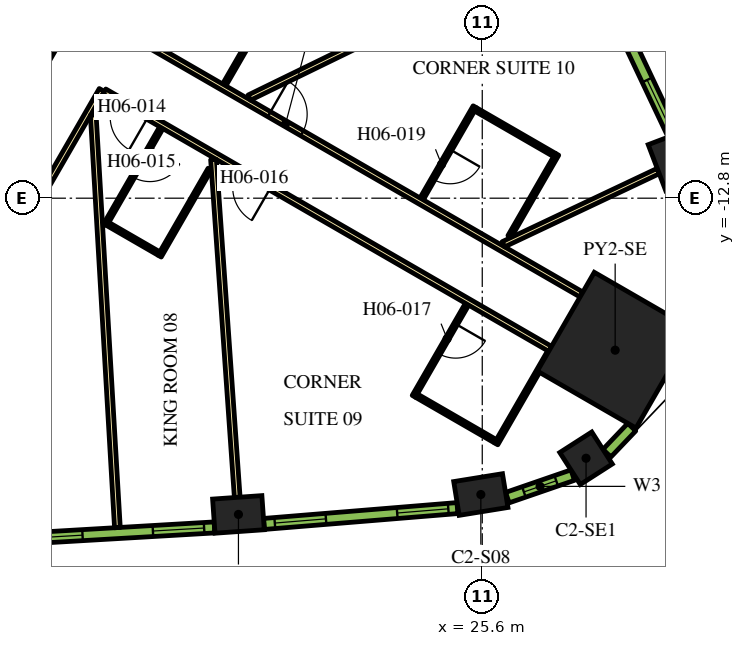
"""IFC4 building model, lengths in metres.
Left out: names, types, materials, properties, quantities, classifications, styles, units other than length and angle.
Written with IfcOpenShell. Run it as: python <this file> out.ifc"""

import sys

from ifc_helpers import new_model, si_unit, direction, frame, frame_2d, origin, origin_2d, place, context, subcontext, project, spatial, rectangle, extrude, element, fill, save


model = new_model("IFC4")
c1 = context("Model", 3, precision=1e-05, world=origin(), true_north=direction((0.0, 1.0)))
c2 = subcontext(c1, "Body", "Model", "MODEL_VIEW")
j1 = project(units=[si_unit("LENGTHUNIT", "METRE"), si_unit("PLANEANGLEUNIT", "RADIAN")], contexts=[c1])
p1 = place(None, origin())
s1 = spatial("IfcSite", under=j1, at=p1, CompositionType="ELEMENT")
p2 = place(p1, origin())
s2 = spatial("IfcBuilding", under=s1, at=p2, CompositionType="ELEMENT")
p3 = place(p2, frame((0.0, 0.0, 87.6)))
s3 = spatial("IfcBuildingStorey", under=s2, at=p3, CompositionType="ELEMENT", Elevation=87.6)
p4 = place(p3, frame((29.097, -16.799, 0.0), z_axis=(0.0, 0.0, 1.0), x_axis=(0.866025403784, -0.5, 0.0)))
e1 = element("IfcColumn", 1, at=p4, inside=s3, PredefinedType="COLUMN", context=c2, shape_type="SweptSolid", body=[
    extrude(rectangle(XDim=3.0, YDim=3.0, at=origin_2d()), origin(), (0.0, 0.0, 1.0), 3.9),
])
for number, where, z_axis, x_axis in (
    (2, (19.184, -21.12, 0.0), (0.0, 0.0, 1.0), (0.998, 0.07, 0.0)),
    (3, (25.563, -20.597, 0.0), (0.0, 0.0, 1.0), (0.987, 0.159, 0.0)),
):
    element("IfcColumn", number, at=place(p3, frame(where, z_axis=z_axis, x_axis=x_axis)), inside=s3, PredefinedType="COLUMN", context=c2, shape_type="SweptSolid", body=[
        extrude(rectangle(XDim=1.3, YDim=0.9, at=origin_2d()), origin(), (0.0, 0.0, 1.0), 3.9),
    ])
p5 = place(p3, frame((28.331, -19.643, 0.0), z_axis=(0.0, 0.0, 1.0), x_axis=(0.841700252504, 0.53994507585, 0.0)))
e4 = element("IfcColumn", 4, at=p5, inside=s3, PredefinedType="COLUMN", context=c2, shape_type="SweptSolid", body=[
    extrude(rectangle(XDim=1.0, YDim=1.0, at=origin_2d()), origin(), (0.0, 0.0, 1.0), 3.9),
])
p6 = place(p3, frame((30.619, -11.839, 0.0), z_axis=(0.0, 0.0, 1.0), x_axis=(-0.355493616145, 0.934678708905, 0.0)))
e5 = element("IfcColumn", 5, at=p6, inside=s3, PredefinedType="COLUMN", context=c2, shape_type="SweptSolid", body=[
    extrude(rectangle(XDim=1.3, YDim=0.9, at=origin_2d()), origin(), (0.0, 0.0, 1.0), 3.9),
])
p7 = place(p3, frame((11.695, -12.644, 0.0), z_axis=(0.0, 0.0, 1.0), x_axis=(0.500010229568, 0.86601949766, 0.0)))
e6 = element("IfcWall", 6, at=p7, inside=s3, PredefinedType="SOLIDWALL", context=c2, shape_type="SweptSolid", body=[
    extrude(rectangle(XDim=9.326, YDim=0.9, at=frame_2d((4.663, 0.0))), origin(), (0.0, 0.0, 1.0), 3.9),
])
p8 = place(p3, frame((12.885, -9.431, 0.0), z_axis=(0.0, 0.0, 1.0), x_axis=(0.500020560727, 0.866013532718, 0.0)))
e7 = element("IfcWall", 7, at=p8, inside=s3, PredefinedType="SOLIDWALL", context=c2, shape_type="SweptSolid", body=[
    extrude(rectangle(XDim=3.45, YDim=0.25, at=frame_2d((1.725, 0.0))), origin(), (0.0, 0.0, 1.0), 3.9),
])
p9 = place(p3, frame((16.412, -8.523, 0.0), z_axis=(0.0, 0.0, 1.0), x_axis=(0.866025629663, -0.499999608766, 0.0)))
e8 = element("IfcWall", 8, at=p9, inside=s3, PredefinedType="PARTITIONING", context=c2, shape_type="SweptSolid", body=[
    extrude(rectangle(XDim=13.624, YDim=0.15, at=frame_2d((6.812, 0.0))), origin(), (0.0, 0.0, 1.0), 2.75),
])
p10 = place(p9, frame((4.134, 0.0, 0.0)))
e9 = element("IfcOpeningElement", 9, at=p10, cuts=e8, PredefinedType="OPENING", context=c2, shape_type="SweptSolid", body=[
    extrude(rectangle(XDim=1.0, YDim=2.1, at=frame_2d((0.5, 1.05))), frame((0.0, 0.085, 0.0), z_axis=(0.0, -1.0, 0.0), x_axis=(1.0, 0.0, 0.0)), (0.0, 0.0, 1.0), 0.17),
])
p11 = place(p3, frame((15.587, -9.952, 0.0), z_axis=(0.0, 0.0, 1.0), x_axis=(-0.500016618951, -0.866015808616, 0.0)))
e10 = element("IfcWall", 10, at=p11, inside=s3, PredefinedType="PARTITIONING", context=c2, shape_type="SweptSolid", body=[
    extrude(rectangle(XDim=5.268, YDim=0.15, at=frame_2d((2.634, 0.0))), origin(), (0.0, 0.0, 1.0), 2.75),
])
p12 = place(p3, frame((27.386, -16.764, 0.0), z_axis=(0.0, 0.0, 1.0), x_axis=(-0.866022585856, 0.500004880763, 0.0)))
e11 = element("IfcWall", 11, at=p12, inside=s3, PredefinedType="PARTITIONING", context=c2, shape_type="SweptSolid", body=[
    extrude(rectangle(XDim=13.544, YDim=0.15, at=frame_2d((6.772, 0.0))), origin(), (0.0, 0.0, 1.0), 2.75),
])
p13 = place(p12, frame((12.214, 0.0, 0.0)))
e12 = element("IfcOpeningElement", 12, at=p13, cuts=e11, PredefinedType="OPENING", context=c2, shape_type="SweptSolid", body=[
    extrude(rectangle(XDim=1.0, YDim=2.1, at=frame_2d((0.5, 1.05))), frame((0.0, 0.085, 0.0), z_axis=(0.0, -1.0, 0.0), x_axis=(1.0, 0.0, 0.0)), (0.0, 0.0, 1.0), 0.17),
])
p14 = place(p12, frame((8.49, 0.0, 0.0)))
e13 = element("IfcOpeningElement", 13, at=p14, cuts=e11, PredefinedType="OPENING", context=c2, shape_type="SweptSolid", body=[
    extrude(rectangle(XDim=1.0, YDim=2.1, at=frame_2d((0.5, 1.05))), frame((0.0, 0.085, 0.0), z_axis=(0.0, -1.0, 0.0), x_axis=(1.0, 0.0, 0.0)), (0.0, 0.0, 1.0), 0.17),
])
p15 = place(p3, frame((15.999, -21.467, 0.0), z_axis=(0.0, 0.0, 1.0), x_axis=(-0.058433825336, 0.998291284173, 0.0)))
e14 = element("IfcWall", 14, at=p15, inside=s3, PredefinedType="PARTITIONING", context=c2, shape_type="SweptSolid", body=[
    extrude(rectangle(XDim=10.875, YDim=0.15, at=frame_2d((5.438, 0.0))), origin(), (0.0, 0.0, 1.0), 2.75),
])
p16 = place(p3, frame((19.153, -20.671, 0.0), z_axis=(0.0, 0.0, 1.0), x_axis=(-0.070070736723, 0.997542025107, 0.0)))
e15 = element("IfcWall", 15, at=p16, inside=s3, PredefinedType="PARTITIONING", context=c2, shape_type="SweptSolid", body=[
    extrude(rectangle(XDim=8.909, YDim=0.15, at=frame_2d((4.455, 0.0))), origin(), (0.0, 0.0, 1.0), 2.75),
])
p17 = place(p3, frame((27.479, -6.251, 0.0), z_axis=(0.0, 0.0, 1.0), x_axis=(-0.898945877276, -0.438059710231, 0.0)))
e16 = element("IfcWall", 16, at=p17, inside=s3, PredefinedType="PARTITIONING", context=c2, shape_type="SweptSolid", body=[
    extrude(rectangle(XDim=8.909, YDim=0.15, at=frame_2d((4.455, 0.0))), origin(), (0.0, 0.0, 1.0), 2.75),
])
p18 = place(p3, frame((30.231, -12.085, 0.0), z_axis=(0.0, 0.0, 1.0), x_axis=(-0.904001132572, -0.427530060122, 0.0)))
e17 = element("IfcWall", 17, at=p18, inside=s3, PredefinedType="PARTITIONING", context=c2, shape_type="SweptSolid", body=[
    extrude(rectangle(XDim=4.51, YDim=0.15, at=frame_2d((2.255, 0.0))), origin(), (0.0, 0.0, 1.0), 2.75),
])
p19 = place(p3, frame((17.155, -10.944, 0.0), z_axis=(0.0, 0.0, 1.0), x_axis=(-0.499939757307, -0.866060182126, 0.0)))
e18 = element("IfcWall", 18, at=p19, inside=s3, PredefinedType="PARTITIONING", context=c2, shape_type="SweptSolid", body=[
    extrude(rectangle(XDim=2.95, YDim=0.1, at=frame_2d((1.475, 0.0))), origin(), (0.0, 0.0, 1.0), 2.75),
])
p20 = place(p19, frame((0.6, 0.0, 0.0)))
e19 = element("IfcOpeningElement", 19, at=p20, cuts=e18, PredefinedType="OPENING", context=c2, shape_type="SweptSolid", body=[
    extrude(rectangle(XDim=0.9, YDim=2.1, at=frame_2d((0.45, 1.05))), frame((0.0, 0.06, 0.0), z_axis=(0.0, -1.0, 0.0), x_axis=(1.0, 0.0, 0.0)), (0.0, 0.0, 1.0), 0.12),
])
p21 = place(p3, frame((15.748, -13.48, 0.0), z_axis=(0.0, 0.0, 1.0), x_axis=(0.866083307622, -0.499899694197, 0.0)))
e20 = element("IfcWall", 20, at=p21, inside=s3, PredefinedType="PARTITIONING", context=c2, shape_type="SweptSolid", body=[
    extrude(rectangle(XDim=1.55, YDim=0.1, at=frame_2d((0.775, 0.0))), origin(), (0.0, 0.0, 1.0), 2.75),
])
p22 = place(p3, frame((18.429, -12.037, 0.0), z_axis=(0.0, 0.0, 1.0), x_axis=(-0.500007957085, -0.86602080971, 0.0)))
e21 = element("IfcWall", 21, at=p22, inside=s3, PredefinedType="PARTITIONING", context=c2, shape_type="SweptSolid", body=[
    extrude(rectangle(XDim=2.64, YDim=0.1, at=frame_2d((1.32, 0.0))), origin(), (0.0, 0.0, 1.0), 2.75),
])
p23 = place(p3, frame((25.2, -15.589, 0.0), z_axis=(0.0, 0.0, 1.0), x_axis=(-0.500011755427, -0.866018616679, 0.0)))
e22 = element("IfcWall", 22, at=p23, inside=s3, PredefinedType="PARTITIONING", context=c2, shape_type="SweptSolid", body=[
    extrude(rectangle(XDim=2.8, YDim=0.1, at=frame_2d((1.4, 0.0))), origin(), (0.0, 0.0, 1.0), 2.75),
])
p24 = place(p23, frame((0.6, 0.0, 0.0)))
e23 = element("IfcOpeningElement", 23, at=p24, cuts=e22, PredefinedType="OPENING", context=c2, shape_type="SweptSolid", body=[
    extrude(rectangle(XDim=0.9, YDim=2.1, at=frame_2d((0.45, 1.05))), frame((0.0, 0.06, 0.0), z_axis=(0.0, -1.0, 0.0), x_axis=(1.0, 0.0, 0.0)), (0.0, 0.0, 1.0), 0.12),
])
p25 = place(p3, frame((23.869, -17.995, 0.0), z_axis=(0.0, 0.0, 1.0), x_axis=(0.866050077142, -0.499957262057, 0.0)))
e24 = element("IfcWall", 24, at=p25, inside=s3, PredefinedType="PARTITIONING", context=c2, shape_type="SweptSolid", body=[
    extrude(rectangle(XDim=2.4, YDim=0.1, at=frame_2d((1.2, 0.0))), origin(), (0.0, 0.0, 1.0), 2.75),
])
p26 = place(p3, frame((27.365, -16.839, 0.0), z_axis=(0.0, 0.0, 1.0), x_axis=(-0.49994636267, -0.866056369097, 0.0)))
e25 = element("IfcWall", 25, at=p26, inside=s3, PredefinedType="PARTITIONING", context=c2, shape_type="SweptSolid", body=[
    extrude(rectangle(XDim=2.8, YDim=0.1, at=frame_2d((1.4, 0.0))), origin(), (0.0, 0.0, 1.0), 2.75),
])
p27 = place(p3, frame((25.404, -10.395, 0.0), z_axis=(0.0, 0.0, 1.0), x_axis=(-0.500011755427, -0.866018616679, 0.0)))
e26 = element("IfcWall", 26, at=p27, inside=s3, PredefinedType="PARTITIONING", context=c2, shape_type="SweptSolid", body=[
    extrude(rectangle(XDim=2.8, YDim=0.1, at=frame_2d((1.4, 0.0))), origin(), (0.0, 0.0, 1.0), 2.75),
])
p28 = place(p27, frame((1.3, 0.0, 0.0)))
e27 = element("IfcOpeningElement", 27, at=p28, cuts=e26, PredefinedType="OPENING", context=c2, shape_type="SweptSolid", body=[
    extrude(rectangle(XDim=0.9, YDim=2.1, at=frame_2d((0.45, 1.05))), frame((0.0, 0.06, 0.0), z_axis=(0.0, -1.0, 0.0), x_axis=(1.0, 0.0, 0.0)), (0.0, 0.0, 1.0), 0.12),
])
p29 = place(p3, frame((25.422, -10.463, 0.0), z_axis=(0.0, 0.0, 1.0), x_axis=(0.866024647952, -0.500001309137, 0.0)))
e28 = element("IfcWall", 28, at=p29, inside=s3, PredefinedType="PARTITIONING", context=c2, shape_type="SweptSolid", body=[
    extrude(rectangle(XDim=2.4, YDim=0.1, at=frame_2d((1.2, 0.0))), origin(), (0.0, 0.0, 1.0), 2.75),
])
p30 = place(p3, frame((26.319, -13.81, 0.0), z_axis=(0.0, 0.0, 1.0), x_axis=(0.499961950354, 0.866047370643, 0.0)))
e29 = element("IfcWall", 29, at=p30, inside=s3, PredefinedType="PARTITIONING", context=c2, shape_type="SweptSolid", body=[
    extrude(rectangle(XDim=2.5, YDim=0.1, at=frame_2d((1.25, 0.0))), origin(), (0.0, 0.0, 1.0), 2.75),
])
p31 = place(p3, frame((19.922, -7.894, 0.0), z_axis=(0.0, 0.0, 1.0), x_axis=(-0.499995378973, -0.866028071719, 0.0)))
e30 = element("IfcWall", 30, at=p31, inside=s3, PredefinedType="PARTITIONING", context=c2, shape_type="SweptSolid", body=[
    extrude(rectangle(XDim=2.22, YDim=0.1, at=frame_2d((1.11, 0.0))), origin(), (0.0, 0.0, 1.0), 2.75),
])
p32 = place(p3, frame((13.462, -21.761, 0.0), z_axis=(0.0, 0.0, 1.0), x_axis=(0.998290511436, 0.058447025388, 0.0)))
e31 = element("IfcWall", 31, at=p32, inside=s3, PredefinedType="SOLIDWALL", context=c2, shape_type="SweptSolid", body=[
    extrude(rectangle(XDim=5.1, YDim=0.29, at=frame_2d((2.55, 0.0))), origin(), (0.0, 0.0, 1.0), 3.65),
])
p33 = place(p32, frame((0.272, 0.0, 0.9)))
e32 = element("IfcOpeningElement", 32, at=p33, cuts=e31, PredefinedType="OPENING", context=c2, shape_type="SweptSolid", body=[
    extrude(rectangle(XDim=1.35, YDim=2.15, at=frame_2d((0.675, 1.075))), frame((0.0, 0.155, 0.0), z_axis=(0.0, -1.0, 0.0), x_axis=(1.0, 0.0, 0.0)), (0.0, 0.0, 1.0), 0.31),
])
p34 = place(p32, frame((3.478, 0.0, 0.9)))
e33 = element("IfcOpeningElement", 33, at=p34, cuts=e31, PredefinedType="OPENING", context=c2, shape_type="SweptSolid", body=[
    extrude(rectangle(XDim=1.35, YDim=2.15, at=frame_2d((0.675, 1.075))), frame((0.0, 0.155, 0.0), z_axis=(0.0, -1.0, 0.0), x_axis=(1.0, 0.0, 0.0)), (0.0, 0.0, 1.0), 0.31),
])
p35 = place(p3, frame((19.857, -21.371, 0.0), z_axis=(0.0, 0.0, 1.0), x_axis=(0.99665273362, 0.081751627308, 0.0)))
e34 = element("IfcWall", 34, at=p35, inside=s3, PredefinedType="SOLIDWALL", context=c2, shape_type="SweptSolid", body=[
    extrude(rectangle(XDim=5.107, YDim=0.29, at=frame_2d((2.553, 0.0))), origin(), (0.0, 0.0, 1.0), 3.65),
])
p36 = place(p35, frame((0.285, 0.0, 0.9)))
e35 = element("IfcOpeningElement", 35, at=p36, cuts=e34, PredefinedType="OPENING", context=c2, shape_type="SweptSolid", body=[
    extrude(rectangle(XDim=1.35, YDim=2.15, at=frame_2d((0.675, 1.075))), frame((0.0, 0.155, 0.0), z_axis=(0.0, -1.0, 0.0), x_axis=(1.0, 0.0, 0.0)), (0.0, 0.0, 1.0), 0.31),
])
p37 = place(p35, frame((3.516, 0.0, 0.9)))
e36 = element("IfcOpeningElement", 36, at=p37, cuts=e34, PredefinedType="OPENING", context=c2, shape_type="SweptSolid", body=[
    extrude(rectangle(XDim=1.35, YDim=2.15, at=frame_2d((0.675, 1.075))), frame((0.0, 0.155, 0.0), z_axis=(0.0, -1.0, 0.0), x_axis=(1.0, 0.0, 0.0)), (0.0, 0.0, 1.0), 0.31),
])
p38 = place(p3, frame((26.261, -20.679, 0.0), z_axis=(0.0, 0.0, 1.0), x_axis=(0.945385815453, 0.325953462844, 0.0)))
e37 = element("IfcWall", 37, at=p38, inside=s3, PredefinedType="SOLIDWALL", context=c2, shape_type="SweptSolid", body=[
    extrude(rectangle(XDim=1.819, YDim=0.29, at=frame_2d((0.91, 0.0))), origin(), (0.0, 0.0, 1.0), 3.65),
])
p39 = place(p38, frame((0.46, 0.0, 0.9)))
e38 = element("IfcOpeningElement", 38, at=p39, cuts=e37, PredefinedType="OPENING", context=c2, shape_type="SweptSolid", body=[
    extrude(rectangle(XDim=0.9, YDim=2.15, at=frame_2d((0.45, 1.075))), frame((0.0, 0.155, 0.0), z_axis=(0.0, -1.0, 0.0), x_axis=(1.0, 0.0, 0.0)), (0.0, 0.0, 1.0), 0.31),
])
p40 = place(p3, frame((28.88, -19.509, 0.0), z_axis=(0.0, 0.0, 1.0), x_axis=(0.690414427296, 0.723414071319, 0.0)))
e39 = element("IfcWall", 39, at=p40, inside=s3, PredefinedType="SOLIDWALL", context=c2, shape_type="SweptSolid", body=[
    extrude(rectangle(XDim=0.947, YDim=0.29, at=frame_2d((0.474, 0.0))), origin(), (0.0, 0.0, 1.0), 3.65),
])
p41 = place(p3, frame((30.62, -11.127, 0.0), z_axis=(0.0, 0.0, 1.0), x_axis=(-0.427543726596, 0.903994669148, 0.0)))
e40 = element("IfcWall", 40, at=p41, inside=s3, PredefinedType="SOLIDWALL", context=c2, shape_type="SweptSolid", body=[
    extrude(rectangle(XDim=5.107, YDim=0.29, at=frame_2d((2.553, 0.0))), origin(), (0.0, 0.0, 1.0), 3.65),
])
p42 = place(p41, frame((0.24, 0.0, 0.9)))
e41 = element("IfcOpeningElement", 41, at=p42, cuts=e40, PredefinedType="OPENING", context=c2, shape_type="SweptSolid", body=[
    extrude(rectangle(XDim=1.35, YDim=2.15, at=frame_2d((0.675, 1.075))), frame((0.0, 0.155, 0.0), z_axis=(0.0, -1.0, 0.0), x_axis=(1.0, 0.0, 0.0)), (0.0, 0.0, 1.0), 0.31),
])
p43 = place(p41, frame((3.471, 0.0, 0.9)))
e42 = element("IfcOpeningElement", 42, at=p43, cuts=e40, PredefinedType="OPENING", context=c2, shape_type="SweptSolid", body=[
    extrude(rectangle(XDim=1.35, YDim=2.15, at=frame_2d((0.675, 1.075))), frame((0.0, 0.155, 0.0), z_axis=(0.0, -1.0, 0.0), x_axis=(1.0, 0.0, 0.0)), (0.0, 0.0, 1.0), 0.31),
])
p44 = place(p13, origin())
e43 = element("IfcDoor", 43, at=p44, inside=s3, OperationType="SINGLE_SWING_RIGHT", PredefinedType="DOOR", context=c2, shape_type="SweptSolid", body=[
    extrude(rectangle(XDim=1.0, YDim=2.1, at=frame_2d((0.5, 1.05))), frame((0.0, 0.025, 0.0), z_axis=(0.0, -1.0, 0.0), x_axis=(1.0, 0.0, 0.0)), (0.0, 0.0, 1.0), 0.05),
])
fill(e12, e43)
p45 = place(p20, origin())
e44 = element("IfcDoor", 44, at=p45, inside=s3, OperationType="SINGLE_SWING_LEFT", PredefinedType="DOOR", context=c2, shape_type="SweptSolid", body=[
    extrude(rectangle(XDim=0.9, YDim=2.1, at=frame_2d((0.45, 1.05))), frame((0.0, 0.025, 0.0), z_axis=(0.0, -1.0, 0.0), x_axis=(1.0, 0.0, 0.0)), (0.0, 0.0, 1.0), 0.05),
])
fill(e19, e44)
p46 = place(p14, origin())
e45 = element("IfcDoor", 45, at=p46, inside=s3, OperationType="SINGLE_SWING_RIGHT", PredefinedType="DOOR", context=c2, shape_type="SweptSolid", body=[
    extrude(rectangle(XDim=1.0, YDim=2.1, at=frame_2d((0.5, 1.05))), frame((0.0, 0.025, 0.0), z_axis=(0.0, -1.0, 0.0), x_axis=(1.0, 0.0, 0.0)), (0.0, 0.0, 1.0), 0.05),
])
fill(e13, e45)
p47 = place(p24, origin())
e46 = element("IfcDoor", 46, at=p47, inside=s3, OperationType="SINGLE_SWING_RIGHT", PredefinedType="DOOR", context=c2, shape_type="SweptSolid", body=[
    extrude(rectangle(XDim=0.9, YDim=2.1, at=frame_2d((0.45, 1.05))), frame((0.0, 0.025, 0.0), z_axis=(0.0, -1.0, 0.0), x_axis=(1.0, 0.0, 0.0)), (0.0, 0.0, 1.0), 0.05),
])
fill(e23, e46)
p48 = place(p10, origin())
e47 = element("IfcDoor", 47, at=p48, inside=s3, OperationType="SINGLE_SWING_LEFT", PredefinedType="DOOR", context=c2, shape_type="SweptSolid", body=[
    extrude(rectangle(XDim=1.0, YDim=2.1, at=frame_2d((0.5, 1.05))), frame((0.0, 0.025, 0.0), z_axis=(0.0, -1.0, 0.0), x_axis=(1.0, 0.0, 0.0)), (0.0, 0.0, 1.0), 0.05),
])
fill(e9, e47)
p49 = place(p28, origin())
e48 = element("IfcDoor", 48, at=p49, inside=s3, OperationType="SINGLE_SWING_LEFT", PredefinedType="DOOR", context=c2, shape_type="SweptSolid", body=[
    extrude(rectangle(XDim=0.9, YDim=2.1, at=frame_2d((0.45, 1.05))), frame((0.0, 0.025, 0.0), z_axis=(0.0, -1.0, 0.0), x_axis=(1.0, 0.0, 0.0)), (0.0, 0.0, 1.0), 0.05),
])
fill(e27, e48)
p50 = place(p33, origin())
e49 = element("IfcWindow", 49, at=p50, inside=s3, PartitioningType="DOUBLE_PANEL_VERTICAL", PredefinedType="WINDOW", context=c2, shape_type="SweptSolid", body=[
    extrude(rectangle(XDim=1.35, YDim=2.15, at=frame_2d((0.675, 1.075))), frame((0.0, 0.015, 0.0), z_axis=(0.0, -1.0, 0.0), x_axis=(1.0, 0.0, 0.0)), (0.0, 0.0, 1.0), 0.06),
])
fill(e32, e49)
p51 = place(p34, origin())
e50 = element("IfcWindow", 50, at=p51, inside=s3, PartitioningType="DOUBLE_PANEL_VERTICAL", PredefinedType="WINDOW", context=c2, shape_type="SweptSolid", body=[
    extrude(rectangle(XDim=1.35, YDim=2.15, at=frame_2d((0.675, 1.075))), frame((0.0, 0.015, 0.0), z_axis=(0.0, -1.0, 0.0), x_axis=(1.0, 0.0, 0.0)), (0.0, 0.0, 1.0), 0.06),
])
fill(e33, e50)
p52 = place(p36, origin())
e51 = element("IfcWindow", 51, at=p52, inside=s3, PartitioningType="DOUBLE_PANEL_VERTICAL", PredefinedType="WINDOW", context=c2, shape_type="SweptSolid", body=[
    extrude(rectangle(XDim=1.35, YDim=2.15, at=frame_2d((0.675, 1.075))), frame((0.0, 0.015, 0.0), z_axis=(0.0, -1.0, 0.0), x_axis=(1.0, 0.0, 0.0)), (0.0, 0.0, 1.0), 0.06),
])
fill(e35, e51)
p53 = place(p37, origin())
e52 = element("IfcWindow", 52, at=p53, inside=s3, PartitioningType="DOUBLE_PANEL_VERTICAL", PredefinedType="WINDOW", context=c2, shape_type="SweptSolid", body=[
    extrude(rectangle(XDim=1.35, YDim=2.15, at=frame_2d((0.675, 1.075))), frame((0.0, 0.015, 0.0), z_axis=(0.0, -1.0, 0.0), x_axis=(1.0, 0.0, 0.0)), (0.0, 0.0, 1.0), 0.06),
])
fill(e36, e52)
p54 = place(p39, origin())
e53 = element("IfcWindow", 53, at=p54, inside=s3, PartitioningType="SINGLE_PANEL", PredefinedType="WINDOW", context=c2, shape_type="SweptSolid", body=[
    extrude(rectangle(XDim=0.9, YDim=2.15, at=frame_2d((0.45, 1.075))), frame((0.0, 0.015, 0.0), z_axis=(0.0, -1.0, 0.0), x_axis=(1.0, 0.0, 0.0)), (0.0, 0.0, 1.0), 0.06),
])
fill(e38, e53)
p55 = place(p42, origin())
e54 = element("IfcWindow", 54, at=p55, inside=s3, PartitioningType="DOUBLE_PANEL_VERTICAL", PredefinedType="WINDOW", context=c2, shape_type="SweptSolid", body=[
    extrude(rectangle(XDim=1.35, YDim=2.15, at=frame_2d((0.675, 1.075))), frame((0.0, 0.015, 0.0), z_axis=(0.0, -1.0, 0.0), x_axis=(1.0, 0.0, 0.0)), (0.0, 0.0, 1.0), 0.06),
])
fill(e41, e54)
save(model, sys.argv[1])
